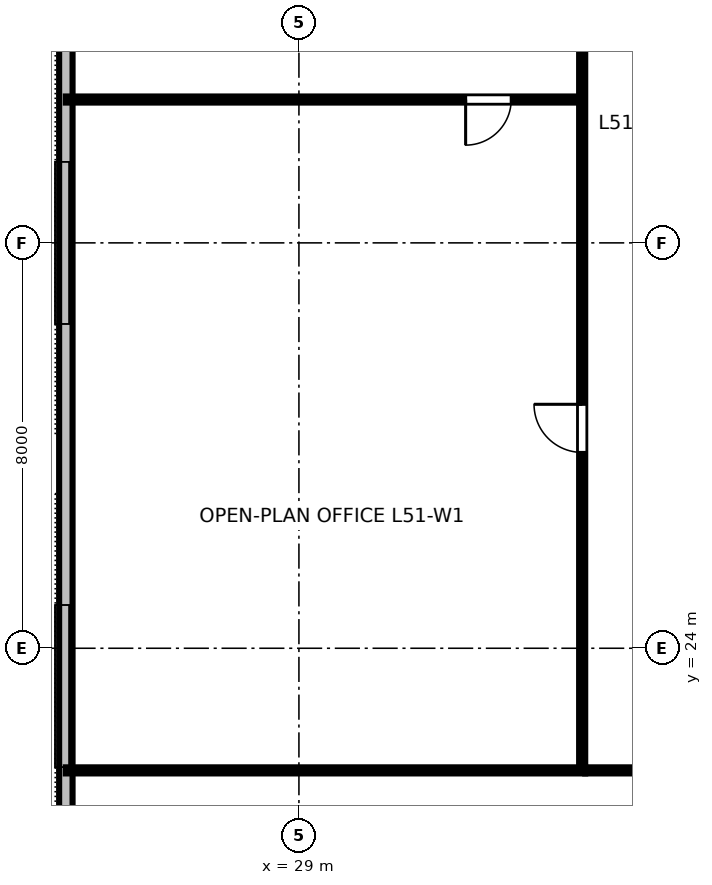
"""IFC4 building model, lengths in metres.
Left out: names, types, materials, properties, quantities, classifications, styles, units other than length and angle.
Written with IfcOpenShell. Run it as: python <this file> out.ifc"""

import sys

from ifc_helpers import new_model, si_unit, direction, frame, frame_2d, origin, origin_2d, place, context, subcontext, project, spatial, rectangle, i_section, extrude, element, fill, save


model = new_model("IFC4")
c1 = context("Model", 3, precision=1e-05, world=origin(), true_north=direction((0.0, 1.0)))
c2 = subcontext(c1, "Body", "Model", "MODEL_VIEW")
j1 = project(units=[si_unit("LENGTHUNIT", "METRE"), si_unit("PLANEANGLEUNIT", "RADIAN")], contexts=[c1])
p1 = place(None, origin())
s1 = spatial("IfcSite", under=j1, at=p1, CompositionType="ELEMENT")
p2 = place(p1, origin())
s2 = spatial("IfcBuilding", under=s1, at=p2, CompositionType="ELEMENT")
p3 = place(p2, frame((0.0, 0.0, 195.0)))
s3 = spatial("IfcBuildingStorey", under=s2, at=p3, CompositionType="ELEMENT", Elevation=195.0)
p4 = place(p3, frame((23.74, 32.0, 0.0), z_axis=(0.225307554603, 0.0, 0.974287691516), x_axis=(-0.974287691516, 0.0, 0.225307554603)))
e1 = element("IfcColumn", 1, at=p4, inside=s3, PredefinedType="COLUMN", context=c2, shape_type="SweptSolid", body=[
    extrude(i_section(OverallWidth=0.401, OverallDepth=0.399, WebThickness=0.025, FlangeThickness=0.04, FilletRadius=0.025, at=origin_2d()), origin(), (0.0, 0.0, 1.0), 3.462),
])
p5 = place(p3, frame((24.4, 46.02, 0.0), z_axis=(0.0, 0.0, 1.0), x_axis=(0.0, -1.0, 0.0)))
e2 = element("IfcWall", 2, at=p5, inside=s3, PredefinedType="STANDARD", context=c2, shape_type="SweptSolid", body=[
    extrude(rectangle(XDim=28.04, YDim=0.265, at=frame_2d((14.02, 0.0))), origin(), (0.0, 0.0, 1.0), 2.832),
])
p6 = place(p3, frame((34.65, 21.59, 0.0), z_axis=(0.0, 0.0, 1.0), x_axis=(1.0, 0.0, 0.0)))
e3 = element("IfcWall", 3, at=p6, inside=s3, PredefinedType="PARTITIONING", context=c2, shape_type="SweptSolid", body=[
    extrude(rectangle(XDim=10.33, YDim=0.12, at=frame_2d((5.165, 0.0))), origin(), (0.0, 0.0, 1.0), 2.655),
])
p7 = place(p6, frame((1.614, 0.0, 0.0)))
e4 = element("IfcOpeningElement", 4, at=p7, cuts=e3, PredefinedType="OPENING", context=c2, shape_type="SweptSolid", body=[
    extrude(rectangle(XDim=0.95, YDim=2.15, at=frame_2d((0.475, 1.075))), frame((0.0, 0.07, 0.0), z_axis=(0.0, -1.0, 0.0), x_axis=(1.0, 0.0, 0.0)), (0.0, 0.0, 1.0), 0.14),
])
p8 = place(p6, frame((6.306, 0.0, 0.0)))
e5 = element("IfcOpeningElement", 5, at=p8, cuts=e3, PredefinedType="OPENING", context=c2, shape_type="SweptSolid", body=[
    extrude(rectangle(XDim=0.95, YDim=2.15, at=frame_2d((0.475, 1.075))), frame((0.0, 0.07, 0.0), z_axis=(0.0, -1.0, 0.0), x_axis=(1.0, 0.0, 0.0)), (0.0, 0.0, 1.0), 0.14),
])
p9 = place(p3, frame((34.59, 34.829, 0.0), z_axis=(0.0, 0.0, 1.0), x_axis=(-1.0, 0.0, 0.0)))
e6 = element("IfcWall", 6, at=p9, inside=s3, PredefinedType="PARTITIONING", context=c2, shape_type="SweptSolid", body=[
    extrude(rectangle(XDim=10.19, YDim=0.12, at=frame_2d((5.095, 0.0))), origin(), (0.0, 0.0, 1.0), 2.655),
])
p10 = place(p9, frame((1.4, 0.0, 0.0)))
e7 = element("IfcOpeningElement", 7, at=p10, cuts=e6, PredefinedType="OPENING", context=c2, shape_type="SweptSolid", body=[
    extrude(rectangle(XDim=0.9, YDim=2.15, at=frame_2d((0.45, 1.075))), frame((0.0, 0.07, 0.0), z_axis=(0.0, -1.0, 0.0), x_axis=(1.0, 0.0, 0.0)), (0.0, 0.0, 1.0), 0.14),
])
p11 = place(p3, frame((34.59, 21.65, 0.0), z_axis=(0.0, 0.0, 1.0), x_axis=(0.0, 1.0, 0.0)))
e8 = element("IfcWall", 8, at=p11, inside=s3, PredefinedType="PARTITIONING", context=c2, shape_type="SweptSolid", body=[
    extrude(rectangle(XDim=20.7, YDim=0.12, at=frame_2d((10.35, 0.0))), origin(), (0.0, 0.0, 1.0), 2.655),
])
p12 = place(p11, frame((6.214, 0.0, 0.0)))
e9 = element("IfcOpeningElement", 9, at=p12, cuts=e8, PredefinedType="OPENING", context=c2, shape_type="SweptSolid", body=[
    extrude(rectangle(XDim=0.95, YDim=2.15, at=frame_2d((0.475, 1.075))), frame((0.0, 0.07, 0.0), z_axis=(0.0, -1.0, 0.0), x_axis=(1.0, 0.0, 0.0)), (0.0, 0.0, 1.0), 0.14),
])
p13 = place(p11, frame((16.365, 0.0, 0.0)))
e10 = element("IfcOpeningElement", 10, at=p13, cuts=e8, PredefinedType="OPENING", context=c2, shape_type="SweptSolid", body=[
    extrude(rectangle(XDim=0.95, YDim=2.15, at=frame_2d((0.475, 1.075))), frame((0.0, 0.07, 0.0), z_axis=(0.0, -1.0, 0.0), x_axis=(1.0, 0.0, 0.0)), (0.0, 0.0, 1.0), 0.14),
])
p14 = place(p3, frame((34.65, 21.59, 0.0), z_axis=(0.0, 0.0, 1.0), x_axis=(-1.0, 0.0, 0.0)))
e11 = element("IfcWall", 11, at=p14, inside=s3, PredefinedType="PARTITIONING", context=c2, shape_type="SweptSolid", body=[
    extrude(rectangle(XDim=10.25, YDim=0.12, at=frame_2d((5.125, 0.0))), origin(), (0.0, 0.0, 1.0), 2.655),
])
p15 = place(p10, origin())
e12 = element("IfcDoor", 12, at=p15, inside=s3, OperationType="SINGLE_SWING_RIGHT", PredefinedType="DOOR", context=c2, shape_type="SweptSolid", body=[
    extrude(rectangle(XDim=0.9, YDim=2.15, at=frame_2d((0.45, 1.075))), frame((0.0, 0.025, 0.0), z_axis=(0.0, -1.0, 0.0), x_axis=(1.0, 0.0, 0.0)), (0.0, 0.0, 1.0), 0.05),
])
fill(e7, e12)
p16 = place(p12, origin())
e13 = element("IfcDoor", 13, at=p16, inside=s3, OperationType="SINGLE_SWING_RIGHT", PredefinedType="DOOR", context=c2, shape_type="SweptSolid", body=[
    extrude(rectangle(XDim=0.95, YDim=2.15, at=frame_2d((0.475, 1.075))), frame((0.0, 0.025, 0.0), z_axis=(0.0, -1.0, 0.0), x_axis=(1.0, 0.0, 0.0)), (0.0, 0.0, 1.0), 0.05),
])
fill(e9, e13)
save(model, sys.argv[1])
